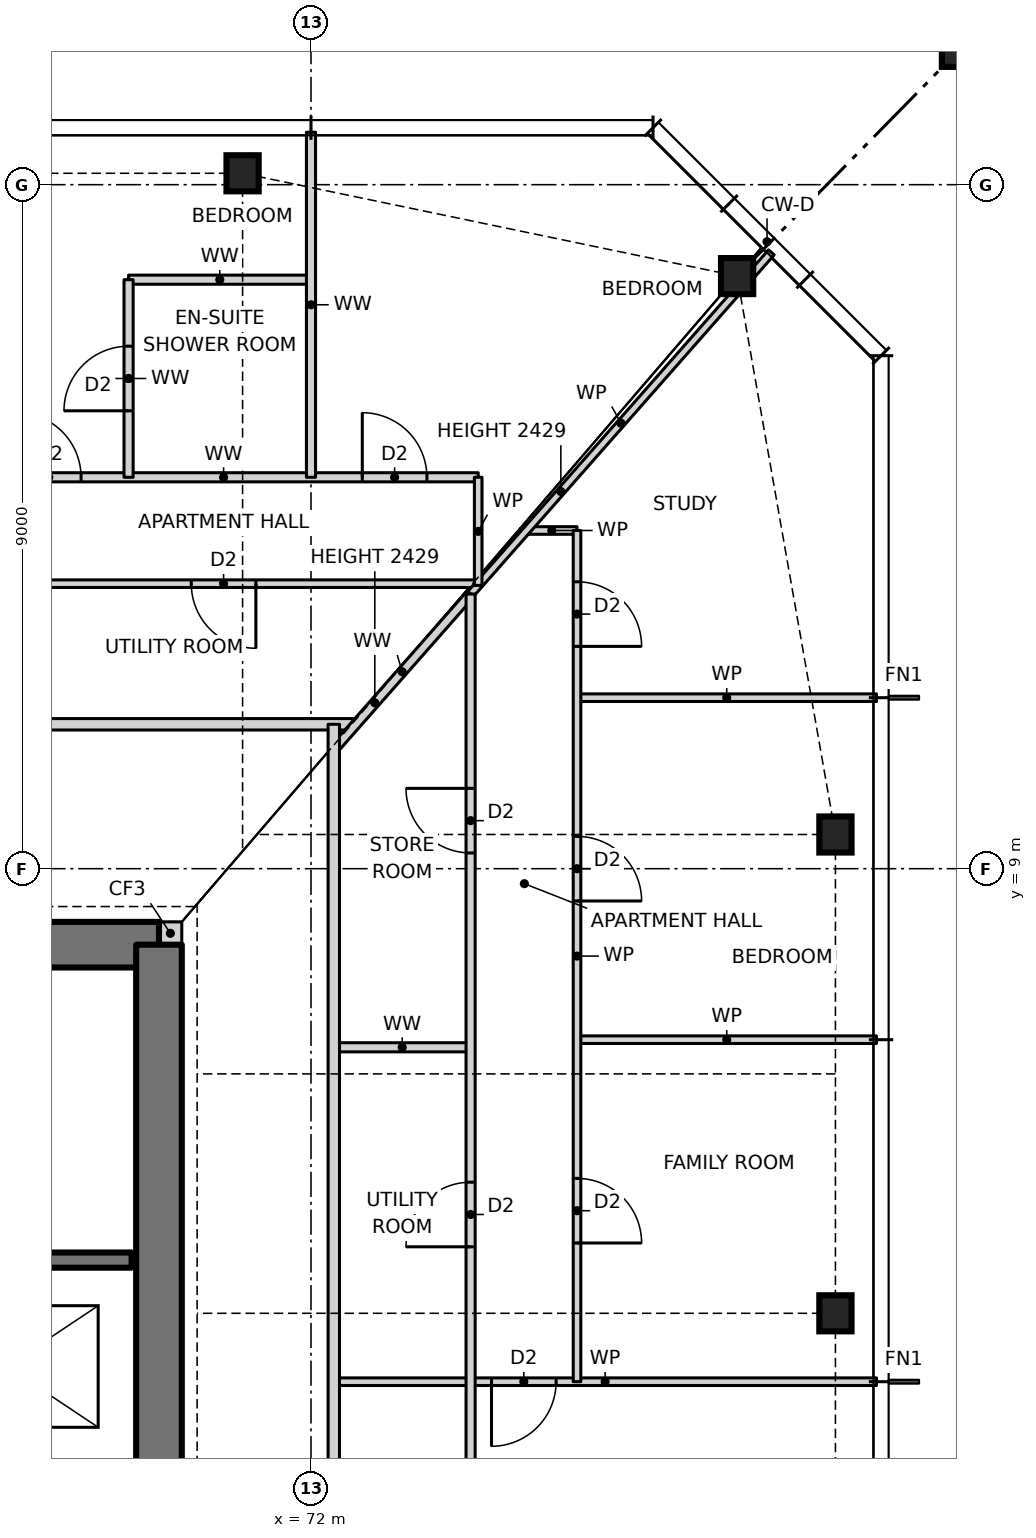
"""IFC4 building model, lengths in metres.
Left out: names, types, materials, properties, quantities, classifications, styles, units other than length and angle.
Written with IfcOpenShell. Run it as: python <this file> out.ifc"""

import sys

from ifc_helpers import new_model, si_unit, direction, frame, frame_2d, origin, origin_2d, place, context, subcontext, project, spatial, rectangle, hollow_rectangle, i_section, extrude, element, fill, save


model = new_model("IFC4")
c1 = context("Model", 3, precision=1e-05, world=origin(), true_north=direction((0.0, 1.0)))
c2 = subcontext(c1, "Body", "Model", "MODEL_VIEW")
j1 = project(units=[si_unit("LENGTHUNIT", "METRE"), si_unit("PLANEANGLEUNIT", "RADIAN")], contexts=[c1])
p1 = place(None, origin())
s1 = spatial("IfcSite", under=j1, at=p1, CompositionType="ELEMENT")
p2 = place(p1, origin())
s2 = spatial("IfcBuilding", under=s1, at=p2, CompositionType="ELEMENT")
p3 = place(p2, frame((0.0, 0.0, 43.0)))
s3 = spatial("IfcBuildingStorey", under=s2, at=p3, CompositionType="ELEMENT", Elevation=43.0)
for number, where, z_axis, x_axis in (
    (1, (78.9, 3.15, 0.0), (0.0, 0.0, 1.0), (1.0, 0.0, 0.0)),
    (2, (78.9, 9.45, 0.0), (0.0, 0.0, 1.0), (1.0, 0.0, 0.0)),
    (3, (77.606, 16.797, 0.0), (0.0, 0.0, 1.0), (1.0, 0.0, 0.0)),
    (4, (71.1, 18.15, 0.0), (0.0, 0.0, 1.0), (1.0, 0.0, 0.0)),
):
    element("IfcColumn", number, at=place(p3, frame(where, z_axis=z_axis, x_axis=x_axis)), inside=s3, PredefinedType="COLUMN", context=c2, shape_type="SweptSolid", body=[
        extrude(i_section(OverallWidth=0.424, OverallDepth=0.475, WebThickness=0.048, FlangeThickness=0.077, at=origin_2d()), origin(), (0.0, 0.0, 1.0), 3.5),
    ])
p4 = place(p3, frame((80.9, 20.15, 0.0), z_axis=(0.0, 0.0, 1.0), x_axis=(1.0, 0.0, 0.0)))
e5 = element("IfcColumn", 5, at=p4, inside=s3, PredefinedType="COLUMN", context=c2, shape_type="SweptSolid", body=[
    extrude(hollow_rectangle(XDim=1.2, YDim=1.2, WallThickness=0.07, at=origin_2d()), origin(), (0.0, 0.0, 1.0), 3.5),
])
p5 = place(p3, frame((70.0, 8.15, 0.0), z_axis=(0.0, 0.0, 1.0), x_axis=(1.0, 0.0, 0.0)))
e6 = element("IfcWall", 6, at=p5, inside=s3, PredefinedType="SOLIDWALL", context=c2, shape_type="SweptSolid", body=[
    extrude(rectangle(XDim=0.3, YDim=0.3, at=frame_2d((0.15, 0.0))), origin(), (0.0, 0.0, 1.0), 3.5),
])
p6 = place(p3, frame((70.0, 8.0, 0.0), z_axis=(0.0, 0.0, 1.0), x_axis=(-1.0, 0.0, 0.0)))
e7 = element("IfcWall", 7, at=p6, inside=s3, PredefinedType="SHEAR", context=c2, shape_type="SweptSolid", body=[
    extrude(rectangle(XDim=14.0, YDim=0.6, at=frame_2d((7.0, 0.0))), origin(), (0.0, 0.0, 1.0), 3.5),
])
p7 = place(p6, frame((8.2, 0.0, 0.0)))
e8 = element("IfcOpeningElement", 8, at=p7, cuts=e7, PredefinedType="OPENING", context=c2, shape_type="SweptSolid", body=[
    extrude(rectangle(XDim=0.9, YDim=2.1, at=frame_2d((0.45, 1.05))), frame((0.0, 0.31, 0.0), z_axis=(0.0, -1.0, 0.0), x_axis=(1.0, 0.0, 0.0)), (0.0, 0.0, 1.0), 0.62),
])
p8 = place(p6, frame((3.2, 0.0, 0.0)))
e9 = element("IfcOpeningElement", 9, at=p8, cuts=e7, PredefinedType="OPENING", context=c2, shape_type="SweptSolid", body=[
    extrude(rectangle(XDim=0.9, YDim=2.1, at=frame_2d((0.45, 1.05))), frame((0.0, 0.31, 0.0), z_axis=(0.0, -1.0, 0.0), x_axis=(1.0, 0.0, 0.0)), (0.0, 0.0, 1.0), 0.62),
])
p9 = place(p3, frame((70.0, -8.0, 0.0), z_axis=(0.0, 0.0, 1.0), x_axis=(0.0, 1.0, 0.0)))
e10 = element("IfcWall", 10, at=p9, inside=s3, PredefinedType="SHEAR", context=c2, shape_type="SweptSolid", body=[
    extrude(rectangle(XDim=16.0, YDim=0.6, at=frame_2d((8.0, 0.0))), origin(), (0.0, 0.0, 1.0), 3.5),
])
p10 = place(p9, frame((7.5, 0.0, 0.0)))
e11 = element("IfcOpeningElement", 11, at=p10, cuts=e10, PredefinedType="OPENING", context=c2, shape_type="SweptSolid", body=[
    extrude(rectangle(XDim=1.0, YDim=2.1, at=frame_2d((0.5, 1.05))), frame((0.0, 0.31, 0.0), z_axis=(0.0, -1.0, 0.0), x_axis=(1.0, 0.0, 0.0)), (0.0, 0.0, 1.0), 0.62),
])
p11 = place(p3, frame((72.3, 2.25, 0.0), z_axis=(0.0, 0.0, 1.0), x_axis=(1.0, 0.0, 0.0)))
e12 = element("IfcWall", 12, at=p11, inside=s3, PredefinedType="PARTITIONING", context=c2, shape_type="SweptSolid", body=[
    extrude(rectangle(XDim=7.14, YDim=0.1, at=frame_2d((3.57, 0.0))), origin(), (0.0, 0.0, 1.0), 3.27),
])
p12 = place(p11, frame((2.075, 0.0, 0.0)))
e13 = element("IfcOpeningElement", 13, at=p12, cuts=e12, PredefinedType="OPENING", context=c2, shape_type="SweptSolid", body=[
    extrude(rectangle(XDim=0.85, YDim=2.1, at=frame_2d((0.425, 1.05))), frame((0.0, 0.06, 0.0), z_axis=(0.0, -1.0, 0.0), x_axis=(1.0, 0.0, 0.0)), (0.0, 0.0, 1.0), 0.12),
])
p13 = place(p3, frame((59.7, 3.85, 0.0), z_axis=(0.0, 0.0, 1.0), x_axis=(1.0, 0.0, 0.0)))
e14 = element("IfcWall", 14, at=p13, inside=s3, PredefinedType="SOLIDWALL", context=c2, shape_type="SweptSolid", body=[
    extrude(rectangle(XDim=9.94, YDim=0.2, at=frame_2d((4.97, 0.0))), origin(), (0.0, 0.0, 1.0), 3.5),
])
p14 = place(p3, frame((72.3, 6.65, 0.0), z_axis=(0.0, 0.0, 1.0), x_axis=(1.0, 0.0, 0.0)))
e15 = element("IfcWall", 15, at=p14, inside=s3, PredefinedType="PARTITIONING", context=c2, shape_type="SweptSolid", body=[
    extrude(rectangle(XDim=1.8, YDim=0.12, at=frame_2d((0.9, 0.0))), origin(), (0.0, 0.0, 1.0), 3.27),
])
p15 = place(p3, frame((75.5, 6.75, 0.0), z_axis=(0.0, 0.0, 1.0), x_axis=(1.0, 0.0, 0.0)))
e16 = element("IfcWall", 16, at=p15, inside=s3, PredefinedType="PARTITIONING", context=c2, shape_type="SweptSolid", body=[
    extrude(rectangle(XDim=3.94, YDim=0.1, at=frame_2d((1.97, 0.0))), origin(), (0.0, 0.0, 1.0), 3.27),
])
p16 = place(p3, frame((53.408, 10.9, 0.0), z_axis=(0.0, 0.0, 1.0), x_axis=(1.0, 0.0, 0.0)))
e17 = element("IfcWall", 17, at=p16, inside=s3, PredefinedType="PARTITIONING", context=c2, shape_type="SweptSolid", body=[
    extrude(rectangle(XDim=19.184, YDim=0.15, at=frame_2d((9.592, 0.0))), origin(), (0.0, 0.0, 1.0), 3.27),
])
p17 = place(p16, frame((8.592, 0.0, 0.0)))
e18 = element("IfcOpeningElement", 18, at=p17, cuts=e17, PredefinedType="OPENING", context=c2, shape_type="SweptSolid", body=[
    extrude(rectangle(XDim=1.0, YDim=2.1, at=frame_2d((0.5, 1.05))), frame((0.0, 0.085, 0.0), z_axis=(0.0, -1.0, 0.0), x_axis=(1.0, 0.0, 0.0)), (0.0, 0.0, 1.0), 0.17),
])
p18 = place(p3, frame((75.5, 11.25, 0.0), z_axis=(0.0, 0.0, 1.0), x_axis=(1.0, 0.0, 0.0)))
e19 = element("IfcWall", 19, at=p18, inside=s3, PredefinedType="PARTITIONING", context=c2, shape_type="SweptSolid", body=[
    extrude(rectangle(XDim=3.94, YDim=0.1, at=frame_2d((1.97, 0.0))), origin(), (0.0, 0.0, 1.0), 3.27),
])
p19 = place(p3, frame((51.8, 12.75, 0.0), z_axis=(0.0, 0.0, 1.0), x_axis=(1.0, 0.0, 0.0)))
e20 = element("IfcWall", 20, at=p19, inside=s3, PredefinedType="PARTITIONING", context=c2, shape_type="SweptSolid", body=[
    extrude(rectangle(XDim=22.4, YDim=0.1, at=frame_2d((11.2, 0.0))), origin(), (0.0, 0.0, 1.0), 3.27),
])
p20 = place(p19, frame((13.475, 0.0, 0.0)))
e21 = element("IfcOpeningElement", 21, at=p20, cuts=e20, PredefinedType="OPENING", context=c2, shape_type="SweptSolid", body=[
    extrude(rectangle(XDim=0.85, YDim=2.1, at=frame_2d((0.425, 1.05))), frame((0.0, 0.06, 0.0), z_axis=(0.0, -1.0, 0.0), x_axis=(1.0, 0.0, 0.0)), (0.0, 0.0, 1.0), 0.12),
])
p21 = place(p19, frame((10.275, 0.0, 0.0)))
e22 = element("IfcOpeningElement", 22, at=p21, cuts=e20, PredefinedType="OPENING", context=c2, shape_type="SweptSolid", body=[
    extrude(rectangle(XDim=0.85, YDim=2.1, at=frame_2d((0.425, 1.05))), frame((0.0, 0.06, 0.0), z_axis=(0.0, -1.0, 0.0), x_axis=(1.0, 0.0, 0.0)), (0.0, 0.0, 1.0), 0.12),
])
p22 = place(p19, frame((18.625, 0.0, 0.0)))
e23 = element("IfcOpeningElement", 23, at=p22, cuts=e20, PredefinedType="OPENING", context=c2, shape_type="SweptSolid", body=[
    extrude(rectangle(XDim=0.85, YDim=2.1, at=frame_2d((0.425, 1.05))), frame((0.0, 0.06, 0.0), z_axis=(0.0, -1.0, 0.0), x_axis=(1.0, 0.0, 0.0)), (0.0, 0.0, 1.0), 0.12),
])
p23 = place(p19, frame((2.925, 0.0, 0.0)))
e24 = element("IfcOpeningElement", 24, at=p23, cuts=e20, PredefinedType="OPENING", context=c2, shape_type="SweptSolid", body=[
    extrude(rectangle(XDim=0.85, YDim=2.1, at=frame_2d((0.425, 1.05))), frame((0.0, 0.06, 0.0), z_axis=(0.0, -1.0, 0.0), x_axis=(1.0, 0.0, 0.0)), (0.0, 0.0, 1.0), 0.12),
])
p24 = place(p3, frame((74.836, 13.45, 0.0), z_axis=(0.0, 0.0, 1.0), x_axis=(1.0, 0.0, 0.0)))
e25 = element("IfcWall", 25, at=p24, inside=s3, PredefinedType="PARTITIONING", context=c2, shape_type="SweptSolid", body=[
    extrude(rectangle(XDim=0.664, YDim=0.1, at=frame_2d((0.332, 0.0))), origin(), (0.0, 0.0, 1.0), 3.27),
])
p25 = place(p3, frame((67.5, 14.15, 0.0), z_axis=(0.0, 0.0, 1.0), x_axis=(1.0, 0.0, 0.0)))
e26 = element("IfcWall", 26, at=p25, inside=s3, PredefinedType="PARTITIONING", context=c2, shape_type="SweptSolid", body=[
    extrude(rectangle(XDim=6.7, YDim=0.12, at=frame_2d((3.35, 0.0))), origin(), (0.0, 0.0, 1.0), 3.27),
])
p26 = place(p25, frame((0.625, 0.0, 0.0)))
e27 = element("IfcOpeningElement", 27, at=p26, cuts=e26, PredefinedType="OPENING", context=c2, shape_type="SweptSolid", body=[
    extrude(rectangle(XDim=0.85, YDim=2.1, at=frame_2d((0.425, 1.05))), frame((0.0, 0.07, 0.0), z_axis=(0.0, -1.0, 0.0), x_axis=(1.0, 0.0, 0.0)), (0.0, 0.0, 1.0), 0.14),
])
p27 = place(p25, frame((5.175, 0.0, 0.0)))
e28 = element("IfcOpeningElement", 28, at=p27, cuts=e26, PredefinedType="OPENING", context=c2, shape_type="SweptSolid", body=[
    extrude(rectangle(XDim=0.85, YDim=2.1, at=frame_2d((0.425, 1.05))), frame((0.0, 0.07, 0.0), z_axis=(0.0, -1.0, 0.0), x_axis=(1.0, 0.0, 0.0)), (0.0, 0.0, 1.0), 0.14),
])
p28 = place(p3, frame((69.6, 16.75, 0.0), z_axis=(0.0, 0.0, 1.0), x_axis=(1.0, 0.0, 0.0)))
e29 = element("IfcWall", 29, at=p28, inside=s3, PredefinedType="PARTITIONING", context=c2, shape_type="SweptSolid", body=[
    extrude(rectangle(XDim=2.4, YDim=0.12, at=frame_2d((1.2, 0.0))), origin(), (0.0, 0.0, 1.0), 3.27),
])
p29 = place(p3, frame((74.1, 12.614, 0.0), z_axis=(0.0, 0.0, 1.0), x_axis=(0.660755619739, 0.750601099775, 0.0)))
e30 = element("IfcWall", 30, at=p29, inside=s3, PredefinedType="PARTITIONING", context=c2, shape_type="SweptSolid", body=[
    extrude(rectangle(XDim=5.989, YDim=0.1, at=frame_2d((2.995, 0.0))), origin(), (0.0, 0.0, 1.0), 2.429),
])
p30 = place(p3, frame((72.299, 10.569, 0.0), z_axis=(0.0, 0.0, 1.0), x_axis=(0.660797520752, 0.750564212155, 0.0)))
e31 = element("IfcWall", 31, at=p30, inside=s3, PredefinedType="PARTITIONING", context=c2, shape_type="SweptSolid", body=[
    extrude(rectangle(XDim=2.725, YDim=0.12, at=frame_2d((1.363, 0.0))), origin(), (0.0, 0.0, 1.0), 2.429),
])
p31 = place(p3, frame((75.5, 2.25, 0.0), z_axis=(0.0, 0.0, 1.0), x_axis=(0.0, 1.0, 0.0)))
e32 = element("IfcWall", 32, at=p31, inside=s3, PredefinedType="PARTITIONING", context=c2, shape_type="SweptSolid", body=[
    extrude(rectangle(XDim=11.2, YDim=0.1, at=frame_2d((5.6, 0.0))), origin(), (0.0, 0.0, 1.0), 3.27),
])
p32 = place(p31, frame((1.825, 0.0, 0.0)))
e33 = element("IfcOpeningElement", 33, at=p32, cuts=e32, PredefinedType="OPENING", context=c2, shape_type="SweptSolid", body=[
    extrude(rectangle(XDim=0.85, YDim=2.1, at=frame_2d((0.425, 1.05))), frame((0.0, 0.06, 0.0), z_axis=(0.0, -1.0, 0.0), x_axis=(1.0, 0.0, 0.0)), (0.0, 0.0, 1.0), 0.12),
])
p33 = place(p31, frame((6.325, 0.0, 0.0)))
e34 = element("IfcOpeningElement", 34, at=p33, cuts=e32, PredefinedType="OPENING", context=c2, shape_type="SweptSolid", body=[
    extrude(rectangle(XDim=0.85, YDim=2.1, at=frame_2d((0.425, 1.05))), frame((0.0, 0.06, 0.0), z_axis=(0.0, -1.0, 0.0), x_axis=(1.0, 0.0, 0.0)), (0.0, 0.0, 1.0), 0.12),
])
p34 = place(p31, frame((9.675, 0.0, 0.0)))
e35 = element("IfcOpeningElement", 35, at=p34, cuts=e32, PredefinedType="OPENING", context=c2, shape_type="SweptSolid", body=[
    extrude(rectangle(XDim=0.85, YDim=2.1, at=frame_2d((0.425, 1.05))), frame((0.0, 0.06, 0.0), z_axis=(0.0, -1.0, 0.0), x_axis=(1.0, 0.0, 0.0)), (0.0, 0.0, 1.0), 0.12),
])
p35 = place(p3, frame((74.2, 12.727, 0.0), z_axis=(0.0, 0.0, 1.0), x_axis=(0.0, 1.0, 0.0)))
e36 = element("IfcWall", 36, at=p35, inside=s3, PredefinedType="PARTITIONING", context=c2, shape_type="SweptSolid", body=[
    extrude(rectangle(XDim=1.423, YDim=0.1, at=frame_2d((0.711, 0.0))), origin(), (0.0, 0.0, 1.0), 3.27),
])
p36 = place(p3, frame((74.1, -12.614, 0.0), z_axis=(0.0, 0.0, 1.0), x_axis=(0.0, 1.0, 0.0)))
e37 = element("IfcWall", 37, at=p36, inside=s3, PredefinedType="PARTITIONING", context=c2, shape_type="SweptSolid", body=[
    extrude(rectangle(XDim=25.228, YDim=0.12, at=frame_2d((12.614, 0.0))), origin(), (0.0, 0.0, 1.0), 3.27),
])
p37 = place(p36, frame((7.239, 0.0, 0.0)))
e38 = element("IfcOpeningElement", 38, at=p37, cuts=e37, PredefinedType="OPENING", context=c2, shape_type="SweptSolid", body=[
    extrude(rectangle(XDim=0.85, YDim=2.1, at=frame_2d((0.425, 1.05))), frame((0.0, 0.07, 0.0), z_axis=(0.0, -1.0, 0.0), x_axis=(1.0, 0.0, 0.0)), (0.0, 0.0, 1.0), 0.14),
])
p38 = place(p36, frame((10.439, 0.0, 0.0)))
e39 = element("IfcOpeningElement", 39, at=p38, cuts=e37, PredefinedType="OPENING", context=c2, shape_type="SweptSolid", body=[
    extrude(rectangle(XDim=0.85, YDim=2.1, at=frame_2d((0.425, 1.05))), frame((0.0, 0.07, 0.0), z_axis=(0.0, -1.0, 0.0), x_axis=(1.0, 0.0, 0.0)), (0.0, 0.0, 1.0), 0.14),
])
p39 = place(p36, frame((2.507, 0.0, 0.0)))
e40 = element("IfcOpeningElement", 40, at=p39, cuts=e37, PredefinedType="OPENING", context=c2, shape_type="SweptSolid", body=[
    extrude(rectangle(XDim=0.85, YDim=2.1, at=frame_2d((0.425, 1.05))), frame((0.0, 0.07, 0.0), z_axis=(0.0, -1.0, 0.0), x_axis=(1.0, 0.0, 0.0)), (0.0, 0.0, 1.0), 0.14),
])
p40 = place(p36, frame((16.639, 0.0, 0.0)))
e41 = element("IfcOpeningElement", 41, at=p40, cuts=e37, PredefinedType="OPENING", context=c2, shape_type="SweptSolid", body=[
    extrude(rectangle(XDim=0.85, YDim=2.1, at=frame_2d((0.425, 1.05))), frame((0.0, 0.07, 0.0), z_axis=(0.0, -1.0, 0.0), x_axis=(1.0, 0.0, 0.0)), (0.0, 0.0, 1.0), 0.14),
])
p41 = place(p36, frame((21.821, 0.0, 0.0)))
e42 = element("IfcOpeningElement", 42, at=p41, cuts=e37, PredefinedType="OPENING", context=c2, shape_type="SweptSolid", body=[
    extrude(rectangle(XDim=0.85, YDim=2.1, at=frame_2d((0.425, 1.05))), frame((0.0, 0.07, 0.0), z_axis=(0.0, -1.0, 0.0), x_axis=(1.0, 0.0, 0.0)), (0.0, 0.0, 1.0), 0.14),
])
p42 = place(p3, frame((72.3, -10.568, 0.0), z_axis=(0.0, 0.0, 1.0), x_axis=(0.0, 1.0, 0.0)))
e43 = element("IfcWall", 43, at=p42, inside=s3, PredefinedType="PARTITIONING", context=c2, shape_type="SweptSolid", body=[
    extrude(rectangle(XDim=21.468, YDim=0.15, at=frame_2d((10.734, 0.0))), origin(), (0.0, 0.0, 1.0), 3.27),
])
p43 = place(p42, frame((8.318, 0.0, 0.0)))
e44 = element("IfcOpeningElement", 44, at=p43, cuts=e43, PredefinedType="OPENING", context=c2, shape_type="SweptSolid", body=[
    extrude(rectangle(XDim=1.0, YDim=2.1, at=frame_2d((0.5, 1.05))), frame((0.0, 0.085, 0.0), z_axis=(0.0, -1.0, 0.0), x_axis=(1.0, 0.0, 0.0)), (0.0, 0.0, 1.0), 0.17),
])
p44 = place(p3, frame((72.0, 14.15, 0.0), z_axis=(0.0, 0.0, 1.0), x_axis=(0.0, 1.0, 0.0)))
e45 = element("IfcWall", 45, at=p44, inside=s3, PredefinedType="PARTITIONING", context=c2, shape_type="SweptSolid", body=[
    extrude(rectangle(XDim=4.54, YDim=0.12, at=frame_2d((2.27, 0.0))), origin(), (0.0, 0.0, 1.0), 3.27),
])
p45 = place(p3, frame((69.6, 14.15, 0.0), z_axis=(0.0, 0.0, 1.0), x_axis=(0.0, 1.0, 0.0)))
e46 = element("IfcWall", 46, at=p45, inside=s3, PredefinedType="PARTITIONING", context=c2, shape_type="SweptSolid", body=[
    extrude(rectangle(XDim=2.6, YDim=0.12, at=frame_2d((1.3, 0.0))), origin(), (0.0, 0.0, 1.0), 3.27),
])
p46 = place(p45, frame((0.875, 0.0, 0.0)))
e47 = element("IfcOpeningElement", 47, at=p46, cuts=e46, PredefinedType="OPENING", context=c2, shape_type="SweptSolid", body=[
    extrude(rectangle(XDim=0.85, YDim=2.1, at=frame_2d((0.425, 1.05))), frame((0.0, 0.07, 0.0), z_axis=(0.0, -1.0, 0.0), x_axis=(1.0, 0.0, 0.0)), (0.0, 0.0, 1.0), 0.14),
])
p47 = place(p12, frame((0.85, 0.0, 0.0), z_axis=(0.0, 0.0, 1.0), x_axis=(-1.0, 0.0, 0.0)))
e48 = element("IfcDoor", 48, at=p47, inside=s3, OperationType="SINGLE_SWING_RIGHT", PredefinedType="DOOR", context=c2, shape_type="SweptSolid", body=[
    extrude(rectangle(XDim=0.85, YDim=2.1, at=frame_2d((0.425, 1.05))), frame((0.0, 0.025, 0.0), z_axis=(0.0, -1.0, 0.0), x_axis=(1.0, 0.0, 0.0)), (0.0, 0.0, 1.0), 0.05),
])
fill(e13, e48)
p48 = place(p32, frame((0.85, 0.0, 0.0), z_axis=(0.0, 0.0, 1.0), x_axis=(-1.0, 0.0, 0.0)))
e49 = element("IfcDoor", 49, at=p48, inside=s3, OperationType="SINGLE_SWING_RIGHT", PredefinedType="DOOR", context=c2, shape_type="SweptSolid", body=[
    extrude(rectangle(XDim=0.85, YDim=2.1, at=frame_2d((0.425, 1.05))), frame((0.0, 0.025, 0.0), z_axis=(0.0, -1.0, 0.0), x_axis=(1.0, 0.0, 0.0)), (0.0, 0.0, 1.0), 0.05),
])
fill(e33, e49)
p49 = place(p33, frame((0.85, 0.0, 0.0), z_axis=(0.0, 0.0, 1.0), x_axis=(-1.0, 0.0, 0.0)))
e50 = element("IfcDoor", 50, at=p49, inside=s3, OperationType="SINGLE_SWING_RIGHT", PredefinedType="DOOR", context=c2, shape_type="SweptSolid", body=[
    extrude(rectangle(XDim=0.85, YDim=2.1, at=frame_2d((0.425, 1.05))), frame((0.0, 0.025, 0.0), z_axis=(0.0, -1.0, 0.0), x_axis=(1.0, 0.0, 0.0)), (0.0, 0.0, 1.0), 0.05),
])
fill(e34, e50)
p50 = place(p34, frame((0.85, 0.0, 0.0), z_axis=(0.0, 0.0, 1.0), x_axis=(-1.0, 0.0, 0.0)))
e51 = element("IfcDoor", 51, at=p50, inside=s3, OperationType="SINGLE_SWING_RIGHT", PredefinedType="DOOR", context=c2, shape_type="SweptSolid", body=[
    extrude(rectangle(XDim=0.85, YDim=2.1, at=frame_2d((0.425, 1.05))), frame((0.0, 0.025, 0.0), z_axis=(0.0, -1.0, 0.0), x_axis=(1.0, 0.0, 0.0)), (0.0, 0.0, 1.0), 0.05),
])
fill(e35, e51)
p51 = place(p40, origin())
e52 = element("IfcDoor", 52, at=p51, inside=s3, OperationType="SINGLE_SWING_LEFT", PredefinedType="DOOR", context=c2, shape_type="SweptSolid", body=[
    extrude(rectangle(XDim=0.85, YDim=2.1, at=frame_2d((0.425, 1.05))), frame((0.0, 0.025, 0.0), z_axis=(0.0, -1.0, 0.0), x_axis=(1.0, 0.0, 0.0)), (0.0, 0.0, 1.0), 0.05),
])
fill(e41, e52)
p52 = place(p41, origin())
e53 = element("IfcDoor", 53, at=p52, inside=s3, OperationType="SINGLE_SWING_RIGHT", PredefinedType="DOOR", context=c2, shape_type="SweptSolid", body=[
    extrude(rectangle(XDim=0.85, YDim=2.1, at=frame_2d((0.425, 1.05))), frame((0.0, 0.025, 0.0), z_axis=(0.0, -1.0, 0.0), x_axis=(1.0, 0.0, 0.0)), (0.0, 0.0, 1.0), 0.05),
])
fill(e42, e53)
p53 = place(p46, origin())
e54 = element("IfcDoor", 54, at=p53, inside=s3, OperationType="SINGLE_SWING_LEFT", PredefinedType="DOOR", context=c2, shape_type="SweptSolid", body=[
    extrude(rectangle(XDim=0.85, YDim=2.1, at=frame_2d((0.425, 1.05))), frame((0.0, 0.025, 0.0), z_axis=(0.0, -1.0, 0.0), x_axis=(1.0, 0.0, 0.0)), (0.0, 0.0, 1.0), 0.05),
])
fill(e47, e54)
p54 = place(p26, origin())
e55 = element("IfcDoor", 55, at=p54, inside=s3, OperationType="SINGLE_SWING_LEFT", PredefinedType="DOOR", context=c2, shape_type="SweptSolid", body=[
    extrude(rectangle(XDim=0.85, YDim=2.1, at=frame_2d((0.425, 1.05))), frame((0.0, 0.025, 0.0), z_axis=(0.0, -1.0, 0.0), x_axis=(1.0, 0.0, 0.0)), (0.0, 0.0, 1.0), 0.05),
])
fill(e27, e55)
p55 = place(p27, origin())
e56 = element("IfcDoor", 56, at=p55, inside=s3, OperationType="SINGLE_SWING_LEFT", PredefinedType="DOOR", context=c2, shape_type="SweptSolid", body=[
    extrude(rectangle(XDim=0.85, YDim=2.1, at=frame_2d((0.425, 1.05))), frame((0.0, 0.025, 0.0), z_axis=(0.0, -1.0, 0.0), x_axis=(1.0, 0.0, 0.0)), (0.0, 0.0, 1.0), 0.05),
])
fill(e28, e56)
p56 = place(p22, frame((0.85, 0.0, 0.0), z_axis=(0.0, 0.0, 1.0), x_axis=(-1.0, 0.0, 0.0)))
e57 = element("IfcDoor", 57, at=p56, inside=s3, OperationType="SINGLE_SWING_LEFT", PredefinedType="DOOR", context=c2, shape_type="SweptSolid", body=[
    extrude(rectangle(XDim=0.85, YDim=2.1, at=frame_2d((0.425, 1.05))), frame((0.0, 0.025, 0.0), z_axis=(0.0, -1.0, 0.0), x_axis=(1.0, 0.0, 0.0)), (0.0, 0.0, 1.0), 0.05),
])
fill(e23, e57)
save(model, sys.argv[1])
